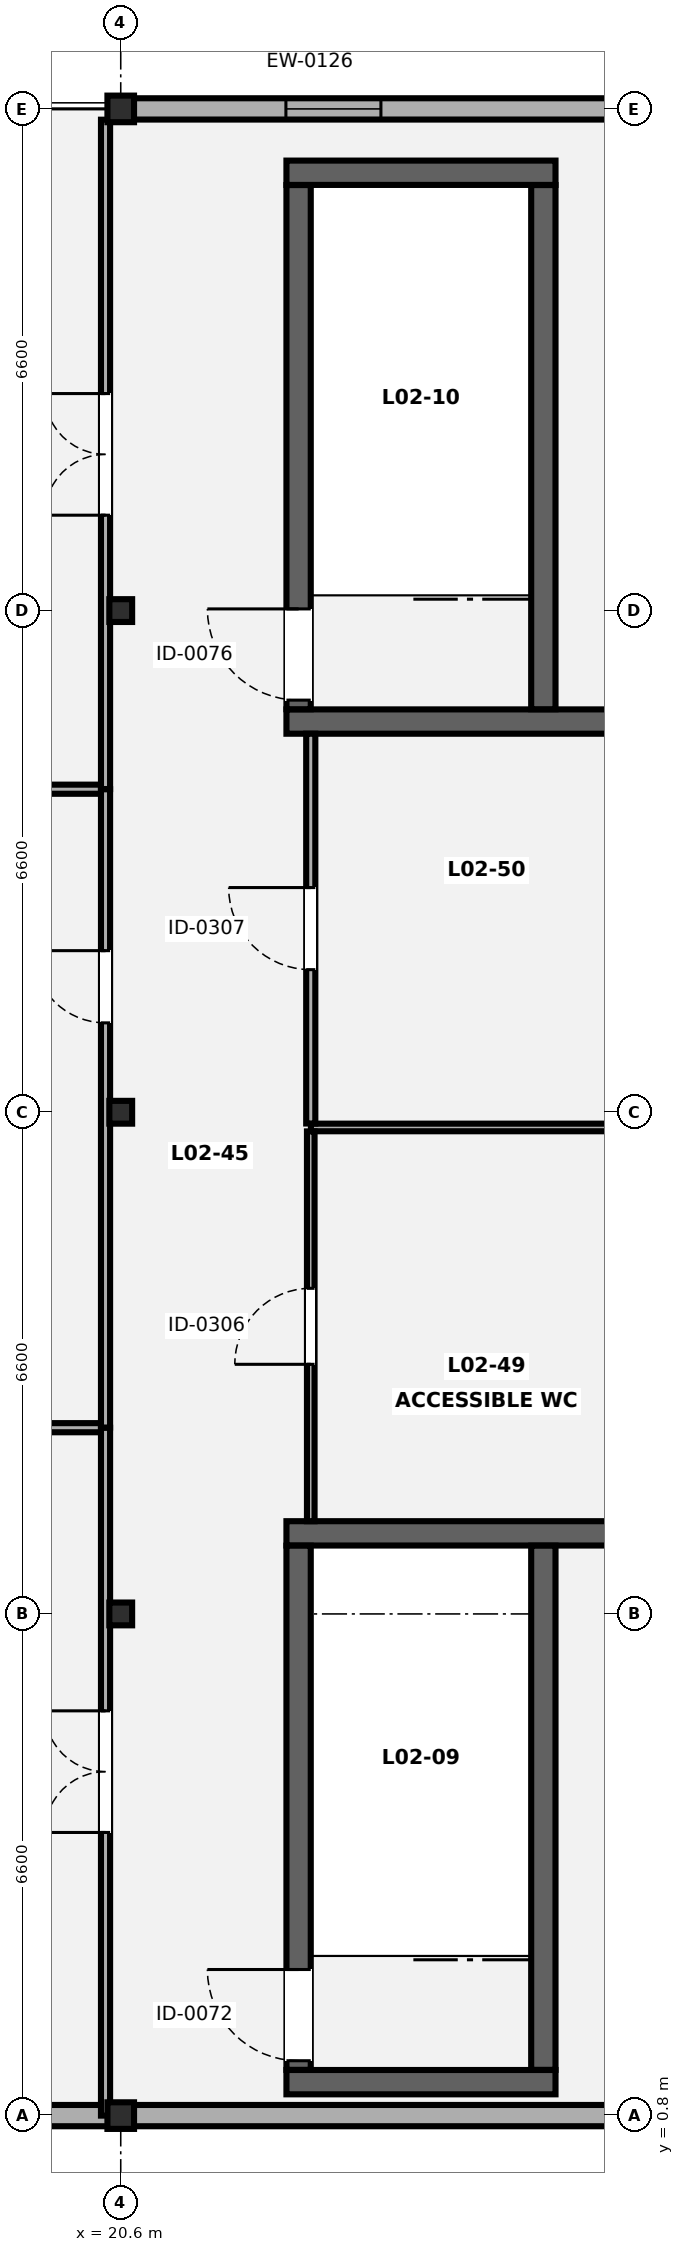
"""IFC4 building model, lengths in metres.
Left out: names, types, materials, properties, quantities, classifications, styles, units other than length and angle.
Written with IfcOpenShell. Run it as: python <this file> out.ifc"""

import sys

from ifc_helpers import new_model, si_unit, direction, frame, frame_2d, origin, origin_2d, place, context, subcontext, project, spatial, rectangle, hollow_rectangle, i_section, extrude, element, fill, save


model = new_model("IFC4")
c1 = context("Model", 3, precision=1e-05, world=origin(), true_north=direction((0.0, 1.0)))
c2 = subcontext(c1, "Body", "Model", "MODEL_VIEW")
j1 = project(units=[si_unit("LENGTHUNIT", "METRE"), si_unit("PLANEANGLEUNIT", "RADIAN")], contexts=[c1])
p1 = place(None, origin())
s1 = spatial("IfcSite", under=j1, at=p1, CompositionType="ELEMENT")
p2 = place(p1, origin())
s2 = spatial("IfcBuilding", under=s1, at=p2, CompositionType="ELEMENT")
p3 = place(p2, frame((0.0, 0.0, 9.1)))
s3 = spatial("IfcBuildingStorey", under=s2, at=p3, CompositionType="ELEMENT", Elevation=9.1)
p4 = place(p3, frame((20.6, 0.8, 0.0), z_axis=(0.0, 0.0, 1.0), x_axis=(1.0, 0.0, 0.0)))
e1 = element("IfcColumn", 1, at=p4, inside=s3, PredefinedType="COLUMN", context=c2, shape_type="SweptSolid", body=[
    extrude(i_section(OverallWidth=0.35, OverallDepth=0.35, WebThickness=0.02, FlangeThickness=0.032, FilletRadius=0.016, at=origin_2d()), origin(), (0.0, 0.0, 1.0), 3.95),
])
for number, where, z_axis, x_axis in (
    (2, (20.6, 7.4, 0.0), (0.0, 0.0, 1.0), (1.0, 0.0, 0.0)),
    (3, (20.6, 14.0, 0.0), (0.0, 0.0, 1.0), (1.0, 0.0, 0.0)),
    (4, (20.6, 20.6, 0.0), (0.0, 0.0, 1.0), (1.0, 0.0, 0.0)),
):
    element("IfcColumn", number, at=place(p3, frame(where, z_axis=z_axis, x_axis=x_axis)), inside=s3, PredefinedType="COLUMN", context=c2, shape_type="SweptSolid", body=[
        extrude(hollow_rectangle(XDim=0.3, YDim=0.3, WallThickness=0.012, at=origin_2d()), origin(), (0.0, 0.0, 1.0), 3.95),
    ])
p5 = place(p3, frame((20.6, 27.2, 0.0), z_axis=(0.0, 0.0, 1.0), x_axis=(1.0, 0.0, 0.0)))
e5 = element("IfcColumn", 5, at=p5, inside=s3, PredefinedType="COLUMN", context=c2, shape_type="SweptSolid", body=[
    extrude(i_section(OverallWidth=0.35, OverallDepth=0.35, WebThickness=0.02, FlangeThickness=0.032, FilletRadius=0.016, at=origin_2d()), origin(), (0.0, 0.0, 1.0), 3.95),
])
p6 = place(p3, frame((20.773, 27.2, 0.0), z_axis=(0.0, 0.0, 1.0), x_axis=(1.0, 0.0, 0.0)))
e6 = element("IfcWall", 6, at=p6, inside=s3, PredefinedType="SOLIDWALL", context=c2, shape_type="SweptSolid", body=[
    extrude(rectangle(XDim=6.254, YDim=0.28, at=frame_2d((3.127, 0.0))), origin(), (0.0, 0.0, 1.0), 3.505),
])
p7 = place(p6, frame((2.0, 0.0, 0.85)))
e7 = element("IfcOpeningElement", 7, at=p7, cuts=e6, PredefinedType="OPENING", context=c2, shape_type="SweptSolid", body=[
    extrude(rectangle(XDim=1.25, YDim=1.4, at=frame_2d((0.625, 0.7))), frame((0.0, 0.15, 0.0), z_axis=(0.0, -1.0, 0.0), x_axis=(1.0, 0.0, 0.0)), (0.0, 0.0, 1.0), 0.3),
])
p8 = place(p3, frame((27.027, 0.8, 0.0), z_axis=(0.0, 0.0, 1.0), x_axis=(-1.0, 0.0, 0.0)))
e8 = element("IfcWall", 8, at=p8, inside=s3, PredefinedType="SOLIDWALL", context=c2, shape_type="SweptSolid", body=[
    extrude(rectangle(XDim=26.054, YDim=0.28, at=frame_2d((13.027, 0.0))), origin(), (0.0, 0.0, 1.0), 3.505),
])
p9 = place(p8, frame((8.0, 0.0, 0.85)))
e9 = element("IfcOpeningElement", 9, at=p9, cuts=e8, PredefinedType="OPENING", context=c2, shape_type="SweptSolid", body=[
    extrude(rectangle(XDim=2.3, YDim=1.4, at=frame_2d((1.15, 0.7))), frame((0.0, 0.15, 0.0), z_axis=(0.0, -1.0, 0.0), x_axis=(1.0, 0.0, 0.0)), (0.0, 0.0, 1.0), 0.3),
])
p10 = place(p8, frame((16.0, 0.0, 0.85)))
e10 = element("IfcOpeningElement", 10, at=p10, cuts=e8, PredefinedType="OPENING", context=c2, shape_type="SweptSolid", body=[
    extrude(rectangle(XDim=2.45, YDim=1.4, at=frame_2d((1.225, 0.7))), frame((0.0, 0.15, 0.0), z_axis=(0.0, -1.0, 0.0), x_axis=(1.0, 0.0, 0.0)), (0.0, 0.0, 1.0), 0.3),
])
p11 = place(p3, frame((22.78, 1.24, 0.0), z_axis=(0.0, 0.0, 1.0), x_axis=(1.0, 0.0, 0.0)))
e11 = element("IfcWall", 11, at=p11, inside=s3, PredefinedType="SHEAR", context=c2, shape_type="SweptSolid", body=[
    extrude(rectangle(XDim=3.54, YDim=0.32, at=frame_2d((1.77, 0.0))), origin(), (0.0, 0.0, 1.0), 4.0),
])
p12 = place(p3, frame((22.78, 8.46, 0.0), z_axis=(0.0, 0.0, 1.0), x_axis=(1.0, 0.0, 0.0)))
e12 = element("IfcWall", 12, at=p12, inside=s3, PredefinedType="SHEAR", context=c2, shape_type="SweptSolid", body=[
    extrude(rectangle(XDim=4.275, YDim=0.32, at=frame_2d((2.137, 0.0))), origin(), (0.0, 0.0, 1.0), 4.0),
])
p13 = place(p3, frame((22.94, 1.402, 0.0), z_axis=(0.0, 0.0, 1.0), x_axis=(0.0, 1.0, 0.0)))
e13 = element("IfcWall", 13, at=p13, inside=s3, PredefinedType="SHEAR", context=c2, shape_type="SweptSolid", body=[
    extrude(rectangle(XDim=6.896, YDim=0.32, at=frame_2d((3.448, 0.0))), origin(), (0.0, 0.0, 1.0), 4.0),
])
p14 = place(p13, frame((0.12, 0.0, 0.0)))
e14 = element("IfcOpeningElement", 14, at=p14, cuts=e13, PredefinedType="OPENING", context=c2, shape_type="SweptSolid", body=[
    extrude(rectangle(XDim=1.2, YDim=2.15, at=frame_2d((0.6, 1.075))), frame((0.0, 0.17, 0.0), z_axis=(0.0, -1.0, 0.0), x_axis=(1.0, 0.0, 0.0)), (0.0, 0.0, 1.0), 0.34),
])
p15 = place(p3, frame((26.16, 1.402, 0.0), z_axis=(0.0, 0.0, 1.0), x_axis=(0.0, 1.0, 0.0)))
e15 = element("IfcWall", 15, at=p15, inside=s3, PredefinedType="SHEAR", context=c2, shape_type="SweptSolid", body=[
    extrude(rectangle(XDim=6.896, YDim=0.32, at=frame_2d((3.448, 0.0))), origin(), (0.0, 0.0, 1.0), 4.0),
])
p16 = place(p3, frame((22.78, 19.14, 0.0), z_axis=(0.0, 0.0, 1.0), x_axis=(1.0, 0.0, 0.0)))
e16 = element("IfcWall", 16, at=p16, inside=s3, PredefinedType="SHEAR", context=c2, shape_type="SweptSolid", body=[
    extrude(rectangle(XDim=4.275, YDim=0.32, at=frame_2d((2.137, 0.0))), origin(), (0.0, 0.0, 1.0), 4.0),
])
p17 = place(p3, frame((22.78, 26.36, 0.0), z_axis=(0.0, 0.0, 1.0), x_axis=(1.0, 0.0, 0.0)))
e17 = element("IfcWall", 17, at=p17, inside=s3, PredefinedType="SHEAR", context=c2, shape_type="SweptSolid", body=[
    extrude(rectangle(XDim=3.54, YDim=0.32, at=frame_2d((1.77, 0.0))), origin(), (0.0, 0.0, 1.0), 4.0),
])
p18 = place(p3, frame((22.94, 19.302, 0.0), z_axis=(0.0, 0.0, 1.0), x_axis=(0.0, 1.0, 0.0)))
e18 = element("IfcWall", 18, at=p18, inside=s3, PredefinedType="SHEAR", context=c2, shape_type="SweptSolid", body=[
    extrude(rectangle(XDim=6.896, YDim=0.32, at=frame_2d((3.448, 0.0))), origin(), (0.0, 0.0, 1.0), 4.0),
])
p19 = place(p18, frame((0.12, 0.0, 0.0)))
e19 = element("IfcOpeningElement", 19, at=p19, cuts=e18, PredefinedType="OPENING", context=c2, shape_type="SweptSolid", body=[
    extrude(rectangle(XDim=1.2, YDim=2.15, at=frame_2d((0.6, 1.075))), frame((0.0, 0.17, 0.0), z_axis=(0.0, -1.0, 0.0), x_axis=(1.0, 0.0, 0.0)), (0.0, 0.0, 1.0), 0.34),
])
p20 = place(p3, frame((26.16, 19.302, 0.0), z_axis=(0.0, 0.0, 1.0), x_axis=(0.0, 1.0, 0.0)))
e20 = element("IfcWall", 20, at=p20, inside=s3, PredefinedType="SHEAR", context=c2, shape_type="SweptSolid", body=[
    extrude(rectangle(XDim=6.896, YDim=0.32, at=frame_2d((3.448, 0.0))), origin(), (0.0, 0.0, 1.0), 4.0),
])
p21 = place(p3, frame((0.8, 9.85, 0.0), z_axis=(0.0, 0.0, 1.0), x_axis=(1.0, 0.0, 0.0)))
e21 = element("IfcWall", 21, at=p21, inside=s3, PredefinedType="PARTITIONING", context=c2, shape_type="SweptSolid", body=[
    extrude(rectangle(XDim=19.6, YDim=0.12, at=frame_2d((9.8, 0.0))), origin(), (0.0, 0.0, 1.0), 3.98),
])
p22 = place(p3, frame((20.4, 0.8, 0.0), z_axis=(0.0, 0.0, 1.0), x_axis=(0.0, 1.0, 0.0)))
e22 = element("IfcWall", 22, at=p22, inside=s3, PredefinedType="PARTITIONING", context=c2, shape_type="SweptSolid", body=[
    extrude(rectangle(XDim=9.05, YDim=0.12, at=frame_2d((4.525, 0.0))), origin(), (0.0, 0.0, 1.0), 3.445),
])
p23 = place(p22, frame((3.725, 0.0, 0.0)))
e23 = element("IfcOpeningElement", 23, at=p23, cuts=e22, PredefinedType="OPENING", context=c2, shape_type="SweptSolid", body=[
    extrude(rectangle(XDim=1.6, YDim=2.18, at=frame_2d((0.8, 1.09))), frame((0.0, 0.07, 0.0), z_axis=(0.0, -1.0, 0.0), x_axis=(1.0, 0.0, 0.0)), (0.0, 0.0, 1.0), 0.14),
])
p24 = place(p3, frame((0.8, 18.25, 0.0), z_axis=(0.0, 0.0, 1.0), x_axis=(1.0, 0.0, 0.0)))
e24 = element("IfcWall", 24, at=p24, inside=s3, PredefinedType="PARTITIONING", context=c2, shape_type="SweptSolid", body=[
    extrude(rectangle(XDim=19.6, YDim=0.12, at=frame_2d((9.8, 0.0))), origin(), (0.0, 0.0, 1.0), 3.98),
])
p25 = place(p3, frame((20.4, 9.852, 0.0), z_axis=(0.0, 0.0, 1.0), x_axis=(0.0, 1.0, 0.0)))
e25 = element("IfcWall", 25, at=p25, inside=s3, PredefinedType="PARTITIONING", context=c2, shape_type="SweptSolid", body=[
    extrude(rectangle(XDim=8.398, YDim=0.12, at=frame_2d((4.199, 0.0))), origin(), (0.0, 0.0, 1.0), 3.445),
])
p26 = place(p25, frame((5.324, 0.0, 0.0)))
e26 = element("IfcOpeningElement", 26, at=p26, cuts=e25, PredefinedType="OPENING", context=c2, shape_type="SweptSolid", body=[
    extrude(rectangle(XDim=0.95, YDim=2.1, at=frame_2d((0.475, 1.05))), frame((0.0, 0.07, 0.0), z_axis=(0.0, -1.0, 0.0), x_axis=(1.0, 0.0, 0.0)), (0.0, 0.0, 1.0), 0.14),
])
p27 = place(p3, frame((20.4, 18.252, 0.0), z_axis=(0.0, 0.0, 1.0), x_axis=(0.0, 1.0, 0.0)))
e27 = element("IfcWall", 27, at=p27, inside=s3, PredefinedType="PARTITIONING", context=c2, shape_type="SweptSolid", body=[
    extrude(rectangle(XDim=8.806, YDim=0.12, at=frame_2d((4.403, 0.0))), origin(), (0.0, 0.0, 1.0), 3.445),
])
p28 = place(p27, frame((3.603, 0.0, 0.0)))
e28 = element("IfcOpeningElement", 28, at=p28, cuts=e27, PredefinedType="OPENING", context=c2, shape_type="SweptSolid", body=[
    extrude(rectangle(XDim=1.6, YDim=2.18, at=frame_2d((0.8, 1.09))), frame((0.0, 0.07, 0.0), z_axis=(0.0, -1.0, 0.0), x_axis=(1.0, 0.0, 0.0)), (0.0, 0.0, 1.0), 0.14),
])
p29 = place(p3, frame((23.102, 13.8, 0.0), z_axis=(0.0, 0.0, 1.0), x_axis=(1.0, 0.0, 0.0)))
e29 = element("IfcWall", 29, at=p29, inside=s3, PredefinedType="PARTITIONING", context=c2, shape_type="SweptSolid", body=[
    extrude(rectangle(XDim=4.098, YDim=0.1, at=frame_2d((2.049, 0.0))), origin(), (0.0, 0.0, 1.0), 2.997),
])
p30 = place(p3, frame((23.1, 8.62, 0.0), z_axis=(0.0, 0.0, 1.0), x_axis=(0.0, 1.0, 0.0)))
e30 = element("IfcWall", 30, at=p30, inside=s3, PredefinedType="PARTITIONING", context=c2, shape_type="SweptSolid", body=[
    extrude(rectangle(XDim=5.128, YDim=0.1, at=frame_2d((2.564, 0.0))), origin(), (0.0, 0.0, 1.0), 3.98),
])
p31 = place(p30, frame((2.064, 0.0, 0.0)))
e31 = element("IfcOpeningElement", 31, at=p31, cuts=e30, PredefinedType="OPENING", context=c2, shape_type="SweptSolid", body=[
    extrude(rectangle(XDim=1.0, YDim=2.1, at=frame_2d((0.5, 1.05))), frame((0.0, 0.06, 0.0), z_axis=(0.0, -1.0, 0.0), x_axis=(1.0, 0.0, 0.0)), (0.0, 0.0, 1.0), 0.12),
])
p32 = place(p3, frame((23.1, 13.852, 0.0), z_axis=(0.0, 0.0, 1.0), x_axis=(0.0, 1.0, 0.0)))
e32 = element("IfcWall", 32, at=p32, inside=s3, PredefinedType="PARTITIONING", context=c2, shape_type="SweptSolid", body=[
    extrude(rectangle(XDim=5.128, YDim=0.12, at=frame_2d((2.564, 0.0))), origin(), (0.0, 0.0, 1.0), 3.98),
])
p33 = place(p32, frame((2.024, 0.0, 0.0)))
e33 = element("IfcOpeningElement", 33, at=p33, cuts=e32, PredefinedType="OPENING", context=c2, shape_type="SweptSolid", body=[
    extrude(rectangle(XDim=1.08, YDim=2.12, at=frame_2d((0.54, 1.06))), frame((0.0, 0.07, 0.0), z_axis=(0.0, -1.0, 0.0), x_axis=(1.0, 0.0, 0.0)), (0.0, 0.0, 1.0), 0.14),
])
p34 = place(p7, origin())
e34 = element("IfcWindow", 34, at=p34, inside=s3, PartitioningType="SINGLE_PANEL", PredefinedType="WINDOW", context=c2, shape_type="SweptSolid", body=[
    extrude(rectangle(XDim=1.25, YDim=1.4, at=frame_2d((0.625, 0.7))), frame((0.0, 0.03, 0.0), z_axis=(0.0, -1.0, 0.0), x_axis=(1.0, 0.0, 0.0)), (0.0, 0.0, 1.0), 0.06),
])
fill(e7, e34)
p35 = place(p14, origin())
e35 = element("IfcDoor", 35, at=p35, inside=s3, OperationType="SINGLE_SWING_RIGHT", PredefinedType="DOOR", context=c2, shape_type="SweptSolid", body=[
    extrude(rectangle(XDim=1.2, YDim=2.15, at=frame_2d((0.6, 1.075))), frame((0.0, 0.025, 0.0), z_axis=(0.0, -1.0, 0.0), x_axis=(1.0, 0.0, 0.0)), (0.0, 0.0, 1.0), 0.05),
])
fill(e14, e35)
p36 = place(p19, origin())
e36 = element("IfcDoor", 36, at=p36, inside=s3, OperationType="SINGLE_SWING_RIGHT", PredefinedType="DOOR", context=c2, shape_type="SweptSolid", body=[
    extrude(rectangle(XDim=1.2, YDim=2.15, at=frame_2d((0.6, 1.075))), frame((0.0, 0.025, 0.0), z_axis=(0.0, -1.0, 0.0), x_axis=(1.0, 0.0, 0.0)), (0.0, 0.0, 1.0), 0.05),
])
fill(e19, e36)
p37 = place(p23, origin())
e37 = element("IfcDoor", 37, at=p37, inside=s3, OperationType="DOUBLE_DOOR_SINGLE_SWING", PredefinedType="DOOR", context=c2, shape_type="SweptSolid", body=[
    extrude(rectangle(XDim=1.6, YDim=2.18, at=frame_2d((0.8, 1.09))), frame((0.0, 0.025, 0.0), z_axis=(0.0, -1.0, 0.0), x_axis=(1.0, 0.0, 0.0)), (0.0, 0.0, 1.0), 0.05),
])
fill(e23, e37)
p38 = place(p26, origin())
e38 = element("IfcDoor", 38, at=p38, inside=s3, OperationType="SINGLE_SWING_RIGHT", PredefinedType="DOOR", context=c2, shape_type="SweptSolid", body=[
    extrude(rectangle(XDim=0.95, YDim=2.1, at=frame_2d((0.475, 1.05))), frame((0.0, 0.025, 0.0), z_axis=(0.0, -1.0, 0.0), x_axis=(1.0, 0.0, 0.0)), (0.0, 0.0, 1.0), 0.05),
])
fill(e26, e38)
p39 = place(p28, origin())
e39 = element("IfcDoor", 39, at=p39, inside=s3, OperationType="DOUBLE_DOOR_SINGLE_SWING", PredefinedType="DOOR", context=c2, shape_type="SweptSolid", body=[
    extrude(rectangle(XDim=1.6, YDim=2.18, at=frame_2d((0.8, 1.09))), frame((0.0, 0.025, 0.0), z_axis=(0.0, -1.0, 0.0), x_axis=(1.0, 0.0, 0.0)), (0.0, 0.0, 1.0), 0.05),
])
fill(e28, e39)
p40 = place(p31, origin())
e40 = element("IfcDoor", 40, at=p40, inside=s3, OperationType="SINGLE_SWING_LEFT", PredefinedType="DOOR", context=c2, shape_type="SweptSolid", body=[
    extrude(rectangle(XDim=1.0, YDim=2.1, at=frame_2d((0.5, 1.05))), frame((0.0, 0.025, 0.0), z_axis=(0.0, -1.0, 0.0), x_axis=(1.0, 0.0, 0.0)), (0.0, 0.0, 1.0), 0.05),
])
fill(e31, e40)
p41 = place(p33, origin())
e41 = element("IfcDoor", 41, at=p41, inside=s3, OperationType="SINGLE_SWING_RIGHT", PredefinedType="DOOR", context=c2, shape_type="SweptSolid", body=[
    extrude(rectangle(XDim=1.08, YDim=2.12, at=frame_2d((0.54, 1.06))), frame((0.0, 0.025, 0.0), z_axis=(0.0, -1.0, 0.0), x_axis=(1.0, 0.0, 0.0)), (0.0, 0.0, 1.0), 0.05),
])
fill(e33, e41)
save(model, sys.argv[1])
